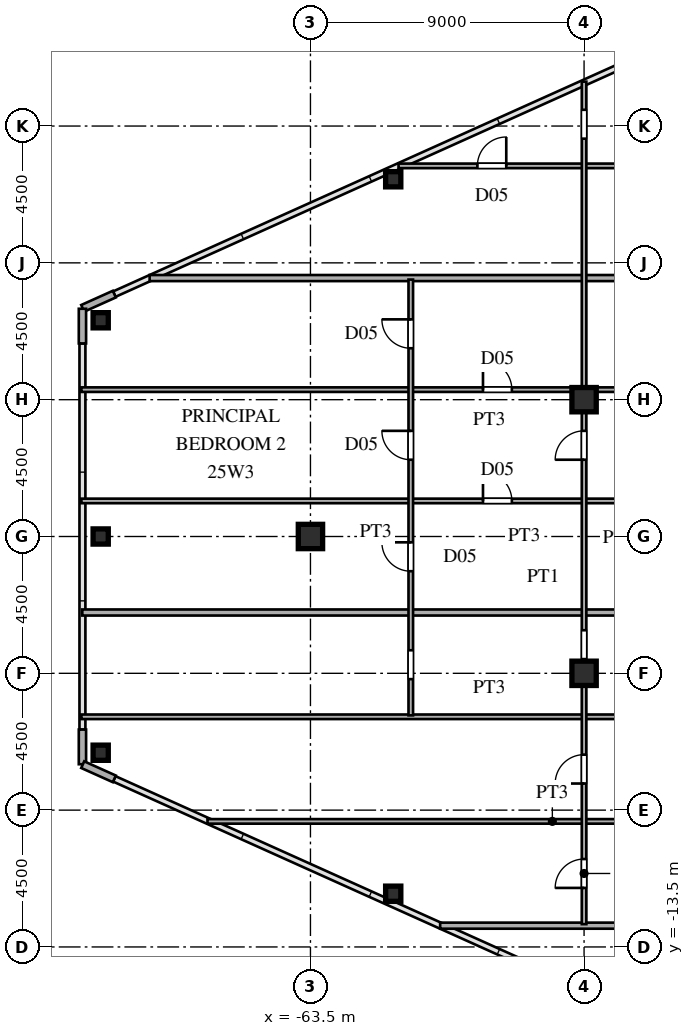
"""IFC4 building model, lengths in metres.
Left out: names, types, materials, properties, quantities, classifications, styles, units other than length and angle.
Written with IfcOpenShell. Run it as: python <this file> out.ifc"""

import sys

from ifc_helpers import new_model, si_unit, direction, frame, frame_2d, origin, origin_2d, place, context, subcontext, project, spatial, rectangle, hollow_rectangle, i_section, extrude, source, transform, mapped, element, fill, save


model = new_model("IFC4")
c1 = context("Model", 3, precision=1e-05, world=origin(), true_north=direction((0.0, 1.0)))
c2 = subcontext(c1, "Body", "Model", "MODEL_VIEW")
j1 = project(units=[si_unit("LENGTHUNIT", "METRE"), si_unit("PLANEANGLEUNIT", "RADIAN")], contexts=[c1])
p1 = place(None, origin())
s1 = spatial("IfcSite", under=j1, at=p1, CompositionType="ELEMENT")
p2 = place(p1, origin())
s2 = spatial("IfcBuilding", under=s1, at=p2, CompositionType="ELEMENT")
p3 = place(p2, frame((0.0, 0.0, 96.0)))
s3 = spatial("IfcBuildingStorey", under=s2, at=p3, CompositionType="ELEMENT", Elevation=96.0)
m1 = source(origin(), c2, "Body", "SweptSolid", [
    extrude(i_section(OverallWidth=0.8, OverallDepth=0.8, WebThickness=0.032, FlangeThickness=0.05, at=origin_2d()), origin(), (0.0, 0.0, 1.0), 3.6),
])
for number, where, z_axis, x_axis in (
    (1, (-54.5, -4.5, 0.0), (0.0, 0.0, 1.0), (1.0, 0.0, 0.0)),
    (2, (-54.5, 4.5, 0.0), (0.0, 0.0, 1.0), (1.0, 0.0, 0.0)),
    (3, (-63.5, 0.0, 0.0), (0.0, 0.0, 1.0), (1.0, 0.0, 0.0)),
):
    element("IfcColumn", number, at=place(p3, frame(where, z_axis=z_axis, x_axis=x_axis)), inside=s3, PredefinedType="COLUMN", context=c2, shape_type="MappedRepresentation", body=[
        mapped(m1, transform((0.0, 0.0, 0.0), scale=1.0)),
    ])
m2 = source(origin(), c2, "Body", "SweptSolid", [
    extrude(hollow_rectangle(XDim=0.5, YDim=0.5, WallThickness=0.02, at=origin_2d()), origin(), (0.0, 0.0, 1.0), 3.6),
])
for number, where, z_axis, x_axis in (
    (4, (-70.4, 7.112, 0.0), (0.0, 0.0, 1.0), (1.0, 0.0, 0.0)),
    (5, (-70.4, -7.112, 0.0), (0.0, 0.0, 1.0), (1.0, 0.0, 0.0)),
    (6, (-60.778, -11.749, 0.0), (0.0, 0.0, 1.0), (1.0, 0.0, 0.0)),
    (7, (-60.778, 11.749, 0.0), (0.0, 0.0, 1.0), (1.0, 0.0, 0.0)),
    (8, (-70.4, 0.0, 0.0), (0.0, 0.0, 1.0), (1.0, 0.0, 0.0)),
):
    element("IfcColumn", number, at=place(p3, frame(where, z_axis=z_axis, x_axis=x_axis)), inside=s3, PredefinedType="COLUMN", context=c2, shape_type="MappedRepresentation", body=[
        mapped(m2, transform((0.0, 0.0, 0.0), scale=1.0)),
    ])
for number, where, z_axis, x_axis in (
    (9, (-69.951, 7.972, 0.0), (0.0, 0.0, 1.0), (-0.912, -0.41, 0.0)),
    (10, (-71.0, 7.49, 0.0), (0.0, 0.0, 1.0), (0.0, -1.0, 0.0)),
    (11, (-71.0, -6.35, 0.0), (0.0, 0.0, 1.0), (0.0, -1.0, 0.0)),
    (12, (-70.991, -7.504, 0.0), (0.0, 0.0, 1.0), (0.912, -0.41, 0.0)),
):
    element("IfcWall", number, at=place(p3, frame(where, z_axis=z_axis, x_axis=x_axis)), inside=s3, PredefinedType="SOLIDWALL", context=c2, shape_type="SweptSolid", body=[
        extrude(rectangle(XDim=1.14, YDim=0.24, at=frame_2d((0.57, 0.0))), origin(), (0.0, 0.0, 1.0), 3.38),
    ])
p4 = place(p3, frame((-59.234, -12.8, 0.0), z_axis=(0.0, 0.0, 1.0), x_axis=(1.0, 0.0, 0.0)))
e13 = element("IfcWall", 13, at=p4, inside=s3, PredefinedType="PARTITIONING", context=c2, shape_type="SweptSolid", body=[
    extrude(rectangle(XDim=20.854, YDim=0.2, at=frame_2d((10.427, 0.0))), origin(), (0.0, 0.0, 1.0), 3.38),
])
p5 = place(p3, frame((-66.887, -9.37, 0.0), z_axis=(0.0, 0.0, 1.0), x_axis=(1.0, 0.0, 0.0)))
e14 = element("IfcWall", 14, at=p5, inside=s3, PredefinedType="PARTITIONING", context=c2, shape_type="SweptSolid", body=[
    extrude(rectangle(XDim=22.687, YDim=0.15, at=frame_2d((11.344, 0.0))), origin(), (0.0, 0.0, 1.0), 3.38),
])
p6 = place(p5, frame((17.087, 0.0, 0.0)))
e15 = element("IfcOpeningElement", 15, at=p6, cuts=e14, PredefinedType="OPENING", context=c2, shape_type="SweptSolid", body=[
    extrude(rectangle(XDim=0.95, YDim=2.15, at=frame_2d((0.475, 1.075))), frame((0.0, 0.085, 0.0), z_axis=(0.0, -1.0, 0.0), x_axis=(1.0, 0.0, 0.0)), (0.0, 0.0, 1.0), 0.17),
])
p7 = place(p3, frame((-71.035, -5.93, 0.0), z_axis=(0.0, 0.0, 1.0), x_axis=(1.0, 0.0, 0.0)))
e16 = element("IfcWall", 16, at=p7, inside=s3, PredefinedType="PARTITIONING", context=c2, shape_type="SweptSolid", body=[
    extrude(rectangle(XDim=26.835, YDim=0.15, at=frame_2d((13.417, 0.0))), origin(), (0.0, 0.0, 1.0), 3.38),
])
p8 = place(p7, frame((21.235, 0.0, 0.0)))
e17 = element("IfcOpeningElement", 17, at=p8, cuts=e16, PredefinedType="OPENING", context=c2, shape_type="SweptSolid", body=[
    extrude(rectangle(XDim=0.95, YDim=2.15, at=frame_2d((0.475, 1.075))), frame((0.0, 0.085, 0.0), z_axis=(0.0, -1.0, 0.0), x_axis=(1.0, 0.0, 0.0)), (0.0, 0.0, 1.0), 0.17),
])
p9 = place(p3, frame((-71.005, -2.5, 0.0), z_axis=(0.0, 0.0, 1.0), x_axis=(1.0, 0.0, 0.0)))
e18 = element("IfcWall", 18, at=p9, inside=s3, PredefinedType="PARTITIONING", context=c2, shape_type="SweptSolid", body=[
    extrude(rectangle(XDim=32.625, YDim=0.2, at=frame_2d((16.312, 0.0))), origin(), (0.0, 0.0, 1.0), 3.38),
])
p10 = place(p3, frame((-71.035, 1.17, 0.0), z_axis=(0.0, 0.0, 1.0), x_axis=(1.0, 0.0, 0.0)))
e19 = element("IfcWall", 19, at=p10, inside=s3, PredefinedType="PARTITIONING", context=c2, shape_type="SweptSolid", body=[
    extrude(rectangle(XDim=26.835, YDim=0.15, at=frame_2d((13.417, 0.0))), origin(), (0.0, 0.0, 1.0), 3.38),
])
p11 = place(p10, frame((21.235, 0.0, 0.0)))
e20 = element("IfcOpeningElement", 20, at=p11, cuts=e19, PredefinedType="OPENING", context=c2, shape_type="SweptSolid", body=[
    extrude(rectangle(XDim=0.95, YDim=2.15, at=frame_2d((0.475, 1.075))), frame((0.0, 0.085, 0.0), z_axis=(0.0, -1.0, 0.0), x_axis=(1.0, 0.0, 0.0)), (0.0, 0.0, 1.0), 0.17),
])
p12 = place(p10, frame((13.21, 0.0, 0.0)))
e21 = element("IfcOpeningElement", 21, at=p12, cuts=e19, PredefinedType="OPENING", context=c2, shape_type="SweptSolid", body=[
    extrude(rectangle(XDim=0.95, YDim=2.15, at=frame_2d((0.475, 1.075))), frame((0.0, 0.085, 0.0), z_axis=(0.0, -1.0, 0.0), x_axis=(1.0, 0.0, 0.0)), (0.0, 0.0, 1.0), 0.17),
])
p13 = place(p3, frame((-71.035, 4.83, 0.0), z_axis=(0.0, 0.0, 1.0), x_axis=(1.0, 0.0, 0.0)))
e22 = element("IfcWall", 22, at=p13, inside=s3, PredefinedType="PARTITIONING", context=c2, shape_type="SweptSolid", body=[
    extrude(rectangle(XDim=26.835, YDim=0.15, at=frame_2d((13.417, 0.0))), origin(), (0.0, 0.0, 1.0), 3.38),
])
p14 = place(p13, frame((21.235, 0.0, 0.0)))
e23 = element("IfcOpeningElement", 23, at=p14, cuts=e22, PredefinedType="OPENING", context=c2, shape_type="SweptSolid", body=[
    extrude(rectangle(XDim=0.95, YDim=2.15, at=frame_2d((0.475, 1.075))), frame((0.0, 0.085, 0.0), z_axis=(0.0, -1.0, 0.0), x_axis=(1.0, 0.0, 0.0)), (0.0, 0.0, 1.0), 0.17),
])
p15 = place(p13, frame((13.21, 0.0, 0.0)))
e24 = element("IfcOpeningElement", 24, at=p15, cuts=e22, PredefinedType="OPENING", context=c2, shape_type="SweptSolid", body=[
    extrude(rectangle(XDim=0.95, YDim=2.15, at=frame_2d((0.475, 1.075))), frame((0.0, 0.085, 0.0), z_axis=(0.0, -1.0, 0.0), x_axis=(1.0, 0.0, 0.0)), (0.0, 0.0, 1.0), 0.17),
])
p16 = place(p3, frame((-68.79, 8.5, 0.0), z_axis=(0.0, 0.0, 1.0), x_axis=(1.0, 0.0, 0.0)))
e25 = element("IfcWall", 25, at=p16, inside=s3, PredefinedType="PARTITIONING", context=c2, shape_type="SweptSolid", body=[
    extrude(rectangle(XDim=30.41, YDim=0.2, at=frame_2d((15.205, 0.0))), origin(), (0.0, 0.0, 1.0), 3.38),
])
p17 = place(p3, frame((-60.603, 12.19, 0.0), z_axis=(0.0, 0.0, 1.0), x_axis=(1.0, 0.0, 0.0)))
e26 = element("IfcWall", 26, at=p17, inside=s3, PredefinedType="PARTITIONING", context=c2, shape_type="SweptSolid", body=[
    extrude(rectangle(XDim=16.403, YDim=0.15, at=frame_2d((8.202, 0.0))), origin(), (0.0, 0.0, 1.0), 3.38),
])
p18 = place(p17, frame((10.803, 0.0, 0.0)))
e27 = element("IfcOpeningElement", 27, at=p18, cuts=e26, PredefinedType="OPENING", context=c2, shape_type="SweptSolid", body=[
    extrude(rectangle(XDim=0.95, YDim=2.15, at=frame_2d((0.475, 1.075))), frame((0.0, 0.085, 0.0), z_axis=(0.0, -1.0, 0.0), x_axis=(1.0, 0.0, 0.0)), (0.0, 0.0, 1.0), 0.17),
])
p19 = place(p17, frame((2.594, 0.0, 0.0)))
e28 = element("IfcOpeningElement", 28, at=p19, cuts=e26, PredefinedType="OPENING", context=c2, shape_type="SweptSolid", body=[
    extrude(rectangle(XDim=0.95, YDim=2.15, at=frame_2d((0.475, 1.075))), frame((0.0, 0.085, 0.0), z_axis=(0.0, -1.0, 0.0), x_axis=(1.0, 0.0, 0.0)), (0.0, 0.0, 1.0), 0.17),
])
p20 = place(p3, frame((-60.2, -5.883, 0.0), z_axis=(0.0, 0.0, 1.0), x_axis=(0.0, 1.0, 0.0)))
e29 = element("IfcWall", 29, at=p20, inside=s3, PredefinedType="PARTITIONING", context=c2, shape_type="SweptSolid", body=[
    extrude(rectangle(XDim=14.333, YDim=0.15, at=frame_2d((7.167, 0.0))), origin(), (0.0, 0.0, 1.0), 3.38),
])
p21 = place(p20, frame((1.191, 0.0, 0.0)))
e30 = element("IfcOpeningElement", 30, at=p21, cuts=e29, PredefinedType="OPENING", context=c2, shape_type="SweptSolid", body=[
    extrude(rectangle(XDim=0.95, YDim=2.15, at=frame_2d((0.475, 1.075))), frame((0.0, 0.085, 0.0), z_axis=(0.0, -1.0, 0.0), x_axis=(1.0, 0.0, 0.0)), (0.0, 0.0, 1.0), 0.17),
])
p22 = place(p20, frame((4.741, 0.0, 0.0)))
e31 = element("IfcOpeningElement", 31, at=p22, cuts=e29, PredefinedType="OPENING", context=c2, shape_type="SweptSolid", body=[
    extrude(rectangle(XDim=0.95, YDim=2.15, at=frame_2d((0.475, 1.075))), frame((0.0, 0.085, 0.0), z_axis=(0.0, -1.0, 0.0), x_axis=(1.0, 0.0, 0.0)), (0.0, 0.0, 1.0), 0.17),
])
p23 = place(p20, frame((8.408, 0.0, 0.0)))
e32 = element("IfcOpeningElement", 32, at=p23, cuts=e29, PredefinedType="OPENING", context=c2, shape_type="SweptSolid", body=[
    extrude(rectangle(XDim=0.95, YDim=2.15, at=frame_2d((0.475, 1.075))), frame((0.0, 0.085, 0.0), z_axis=(0.0, -1.0, 0.0), x_axis=(1.0, 0.0, 0.0)), (0.0, 0.0, 1.0), 0.17),
])
p24 = place(p20, frame((12.075, 0.0, 0.0)))
e33 = element("IfcOpeningElement", 33, at=p24, cuts=e29, PredefinedType="OPENING", context=c2, shape_type="SweptSolid", body=[
    extrude(rectangle(XDim=0.95, YDim=2.15, at=frame_2d((0.475, 1.075))), frame((0.0, 0.085, 0.0), z_axis=(0.0, -1.0, 0.0), x_axis=(1.0, 0.0, 0.0)), (0.0, 0.0, 1.0), 0.17),
])
p25 = place(p3, frame((-54.5, -12.75, 0.0), z_axis=(0.0, 0.0, 1.0), x_axis=(0.0, 1.0, 0.0)))
e34 = element("IfcWall", 34, at=p25, inside=s3, PredefinedType="PARTITIONING", context=c2, shape_type="SweptSolid", body=[
    extrude(rectangle(XDim=27.71, YDim=0.15, at=frame_2d((13.855, 0.0))), origin(), (0.0, 0.0, 1.0), 2.68),
])
p26 = place(p25, frame((4.625, 0.0, 0.0)))
e35 = element("IfcOpeningElement", 35, at=p26, cuts=e34, PredefinedType="OPENING", context=c2, shape_type="SweptSolid", body=[
    extrude(rectangle(XDim=0.95, YDim=2.15, at=frame_2d((0.475, 1.075))), frame((0.0, 0.085, 0.0), z_axis=(0.0, -1.0, 0.0), x_axis=(1.0, 0.0, 0.0)), (0.0, 0.0, 1.0), 0.17),
])
p27 = place(p25, frame((1.192, 0.0, 0.0)))
e36 = element("IfcOpeningElement", 36, at=p27, cuts=e34, PredefinedType="OPENING", context=c2, shape_type="SweptSolid", body=[
    extrude(rectangle(XDim=0.95, YDim=2.15, at=frame_2d((0.475, 1.075))), frame((0.0, 0.085, 0.0), z_axis=(0.0, -1.0, 0.0), x_axis=(1.0, 0.0, 0.0)), (0.0, 0.0, 1.0), 0.17),
])
p28 = place(p25, frame((8.717, 0.0, 0.0)))
e37 = element("IfcOpeningElement", 37, at=p28, cuts=e34, PredefinedType="OPENING", context=c2, shape_type="SweptSolid", body=[
    extrude(rectangle(XDim=0.95, YDim=2.15, at=frame_2d((0.475, 1.075))), frame((0.0, 0.085, 0.0), z_axis=(0.0, -1.0, 0.0), x_axis=(1.0, 0.0, 0.0)), (0.0, 0.0, 1.0), 0.17),
])
p29 = place(p25, frame((15.275, 0.0, 0.0)))
e38 = element("IfcOpeningElement", 38, at=p29, cuts=e34, PredefinedType="OPENING", context=c2, shape_type="SweptSolid", body=[
    extrude(rectangle(XDim=0.95, YDim=2.15, at=frame_2d((0.475, 1.075))), frame((0.0, 0.085, 0.0), z_axis=(0.0, -1.0, 0.0), x_axis=(1.0, 0.0, 0.0)), (0.0, 0.0, 1.0), 0.17),
])
p30 = place(p25, frame((25.835, 0.0, 0.0)))
e39 = element("IfcOpeningElement", 39, at=p30, cuts=e34, PredefinedType="OPENING", context=c2, shape_type="SweptSolid", body=[
    extrude(rectangle(XDim=0.95, YDim=2.15, at=frame_2d((0.475, 1.075))), frame((0.0, 0.085, 0.0), z_axis=(0.0, -1.0, 0.0), x_axis=(1.0, 0.0, 0.0)), (0.0, 0.0, 1.0), 0.17),
])
m3 = source(origin(), c2, "Body", "SweptSolid", [
    extrude(rectangle(XDim=0.95, YDim=2.15, at=frame_2d((0.475, 1.075))), frame((0.0, 0.025, 0.0), z_axis=(0.0, -1.0, 0.0), x_axis=(1.0, 0.0, 0.0)), (0.0, 0.0, 1.0), 0.05),
])
p31 = place(p12, origin())
e40 = element("IfcDoor", 40, at=p31, inside=s3, OperationType="SINGLE_SWING_LEFT", PredefinedType="DOOR", context=c2, shape_type="MappedRepresentation", body=[
    mapped(m3, transform((0.0, 0.0, 0.0), scale=1.0)),
])
fill(e21, e40)
p32 = place(p15, origin())
e41 = element("IfcDoor", 41, at=p32, inside=s3, OperationType="SINGLE_SWING_LEFT", PredefinedType="DOOR", context=c2, shape_type="MappedRepresentation", body=[
    mapped(m3, transform((0.0, 0.0, 0.0), scale=1.0)),
])
fill(e24, e41)
p33 = place(p19, origin())
e42 = element("IfcDoor", 42, at=p33, inside=s3, OperationType="SINGLE_SWING_RIGHT", PredefinedType="DOOR", context=c2, shape_type="MappedRepresentation", body=[
    mapped(m3, transform((0.0, 0.0, 0.0), scale=1.0)),
])
fill(e28, e42)
p34 = place(p22, origin())
e43 = element("IfcDoor", 43, at=p34, inside=s3, OperationType="SINGLE_SWING_RIGHT", PredefinedType="DOOR", context=c2, shape_type="MappedRepresentation", body=[
    mapped(m3, transform((0.0, 0.0, 0.0), scale=1.0)),
])
fill(e31, e43)
p35 = place(p23, origin())
e44 = element("IfcDoor", 44, at=p35, inside=s3, OperationType="SINGLE_SWING_RIGHT", PredefinedType="DOOR", context=c2, shape_type="MappedRepresentation", body=[
    mapped(m3, transform((0.0, 0.0, 0.0), scale=1.0)),
])
fill(e32, e44)
p36 = place(p24, origin())
e45 = element("IfcDoor", 45, at=p36, inside=s3, OperationType="SINGLE_SWING_RIGHT", PredefinedType="DOOR", context=c2, shape_type="MappedRepresentation", body=[
    mapped(m3, transform((0.0, 0.0, 0.0), scale=1.0)),
])
fill(e33, e45)
p37 = place(p26, origin())
e46 = element("IfcDoor", 46, at=p37, inside=s3, OperationType="SINGLE_SWING_LEFT", PredefinedType="DOOR", context=c2, shape_type="MappedRepresentation", body=[
    mapped(m3, transform((0.0, 0.0, 0.0), scale=1.0)),
])
fill(e35, e46)
p38 = place(p27, origin())
e47 = element("IfcDoor", 47, at=p38, inside=s3, OperationType="SINGLE_SWING_LEFT", PredefinedType="DOOR", context=c2, shape_type="MappedRepresentation", body=[
    mapped(m3, transform((0.0, 0.0, 0.0), scale=1.0)),
])
fill(e36, e47)
p39 = place(p29, origin())
e48 = element("IfcDoor", 48, at=p39, inside=s3, OperationType="SINGLE_SWING_LEFT", PredefinedType="DOOR", context=c2, shape_type="MappedRepresentation", body=[
    mapped(m3, transform((0.0, 0.0, 0.0), scale=1.0)),
])
fill(e38, e48)
save(model, sys.argv[1])
